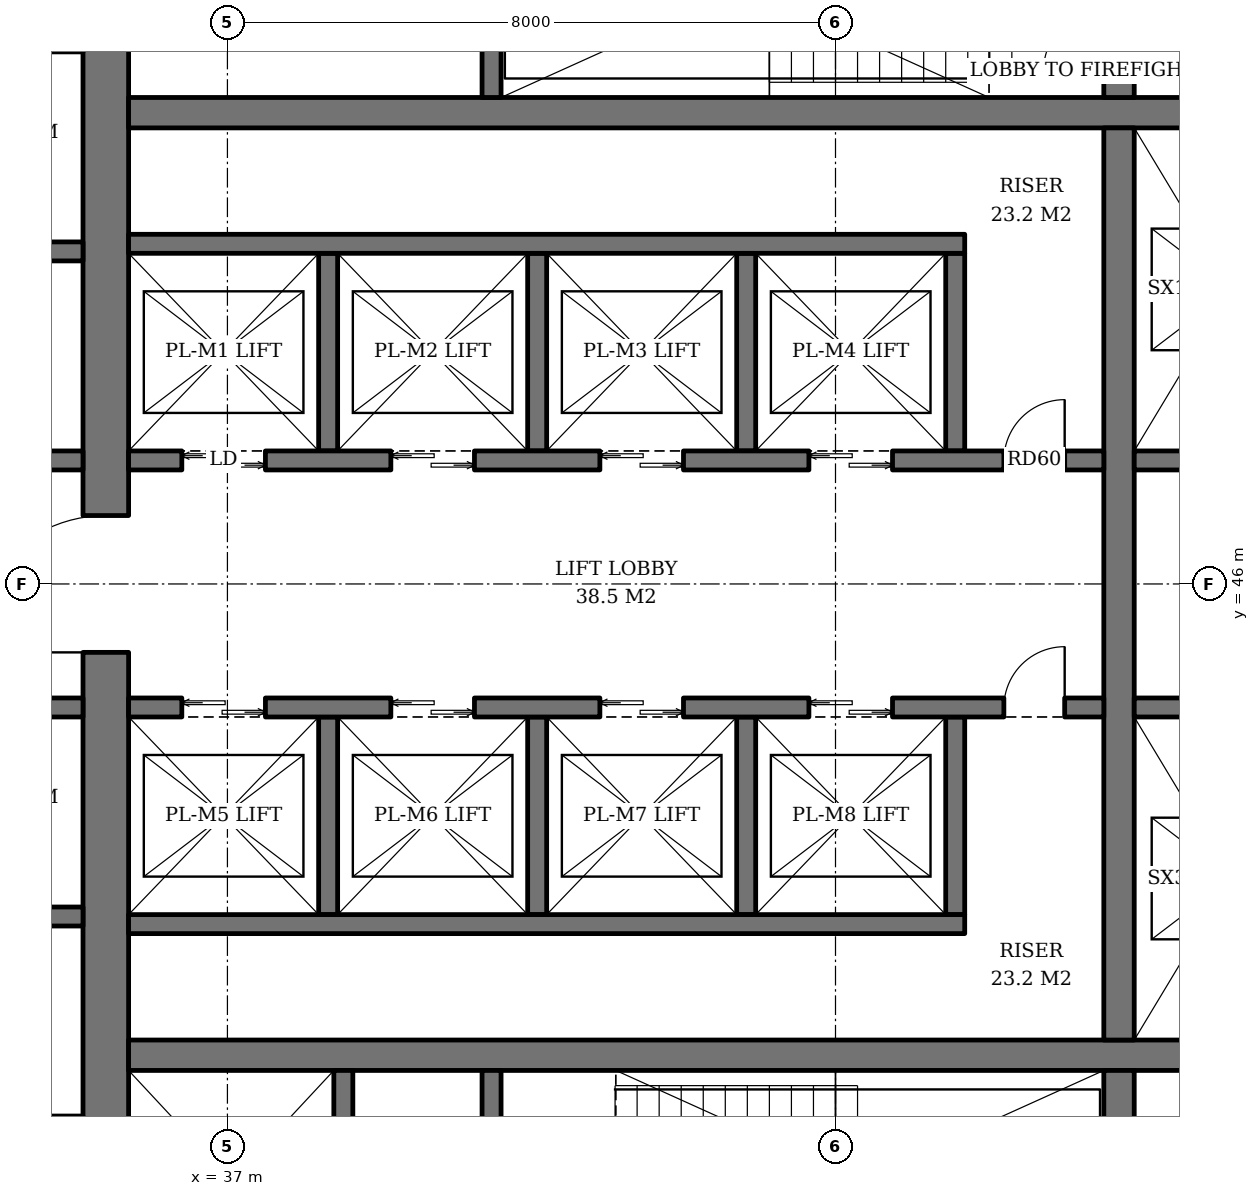
"""IFC4 building model, lengths in metres.
Left out: names, types, materials, properties, quantities, classifications, styles, units other than length and angle.
Written with IfcOpenShell. Run it as: python <this file> out.ifc"""

import sys

from ifc_helpers import new_model, si_unit, direction, frame, frame_2d, origin, place, context, subcontext, project, spatial, rectangle, extrude, element, fill, save


model = new_model("IFC4")
c1 = context("Model", 3, precision=1e-05, world=origin(), true_north=direction((0.0, 1.0)))
c2 = subcontext(c1, "Body", "Model", "MODEL_VIEW")
j1 = project(units=[si_unit("LENGTHUNIT", "METRE"), si_unit("PLANEANGLEUNIT", "RADIAN")], contexts=[c1])
p1 = place(None, origin())
s1 = spatial("IfcSite", under=j1, at=p1, CompositionType="ELEMENT")
p2 = place(p1, origin())
s2 = spatial("IfcBuilding", under=s1, at=p2, CompositionType="ELEMENT")
p3 = place(p2, frame((0.0, 0.0, 131.2)))
s3 = spatial("IfcBuildingStorey", under=s2, at=p3, CompositionType="ELEMENT", Elevation=131.2)
p4 = place(p3, frame((35.4, 36.7, 0.0), z_axis=(0.0, 0.0, 1.0), x_axis=(0.0, 1.0, 0.0)))
e1 = element("IfcWall", 1, at=p4, inside=s3, PredefinedType="SHEAR", context=c2, shape_type="SweptSolid", body=[
    extrude(rectangle(XDim=18.6, YDim=0.6, at=frame_2d((9.3, 0.0))), origin(), (0.0, 0.0, 1.0), 3.8),
])
p5 = place(p4, frame((8.4, 0.0, 0.0)))
e2 = element("IfcOpeningElement", 2, at=p5, cuts=e1, PredefinedType="OPENING", context=c2, shape_type="SweptSolid", body=[
    extrude(rectangle(XDim=1.8, YDim=2.4, at=frame_2d((0.9, 1.2))), frame((0.0, 0.31, 0.0), z_axis=(0.0, -1.0, 0.0), x_axis=(1.0, 0.0, 0.0)), (0.0, 0.0, 1.0), 0.62),
])
for number, where, z_axis, x_axis in (
    (3, (35.7, 39.8, 0.0), (0.0, 0.0, 1.0), (1.0, 0.0, 0.0)),
    (4, (35.7, 52.2, 0.0), (0.0, 0.0, 1.0), (1.0, 0.0, 0.0)),
):
    element("IfcWall", number, at=place(p3, frame(where, z_axis=z_axis, x_axis=x_axis)), inside=s3, PredefinedType="SHEAR", context=c2, shape_type="SweptSolid", body=[
        extrude(rectangle(XDim=18.6, YDim=0.4, at=frame_2d((9.3, 0.0))), origin(), (0.0, 0.0, 1.0), 3.8),
    ])
p6 = place(p3, frame((48.73, 36.7, 0.0), z_axis=(0.0, 0.0, 1.0), x_axis=(0.0, 1.0, 0.0)))
e5 = element("IfcWall", 5, at=p6, inside=s3, PredefinedType="SHEAR", context=c2, shape_type="SweptSolid", body=[
    extrude(rectangle(XDim=2.9, YDim=0.4, at=frame_2d((1.45, 0.0))), origin(), (0.0, 0.0, 1.0), 3.8),
])
p7 = place(p3, frame((48.73, 40.0, 0.0), z_axis=(0.0, 0.0, 1.0), x_axis=(0.0, 1.0, 0.0)))
e6 = element("IfcWall", 6, at=p7, inside=s3, PredefinedType="SHEAR", context=c2, shape_type="SweptSolid", body=[
    extrude(rectangle(XDim=12.0, YDim=0.4, at=frame_2d((6.0, 0.0))), origin(), (0.0, 0.0, 1.0), 3.8),
])
p8 = place(p3, frame((48.73, 52.4, 0.0), z_axis=(0.0, 0.0, 1.0), x_axis=(0.0, 1.0, 0.0)))
e7 = element("IfcWall", 7, at=p8, inside=s3, PredefinedType="SHEAR", context=c2, shape_type="SweptSolid", body=[
    extrude(rectangle(XDim=2.9, YDim=0.4, at=frame_2d((1.45, 0.0))), origin(), (0.0, 0.0, 1.0), 3.8),
])
p9 = place(p8, frame((0.3, 0.0, 0.0)))
e8 = element("IfcOpeningElement", 8, at=p9, cuts=e7, PredefinedType="OPENING", context=c2, shape_type="SweptSolid", body=[
    extrude(rectangle(XDim=1.0, YDim=2.1, at=frame_2d((0.5, 1.05))), frame((0.0, 0.21, 0.0), z_axis=(0.0, -1.0, 0.0), x_axis=(1.0, 0.0, 0.0)), (0.0, 0.0, 1.0), 0.42),
])
p10 = place(p3, frame((38.525, 36.7, 0.0), z_axis=(0.0, 0.0, 1.0), x_axis=(0.0, 1.0, 0.0)))
e9 = element("IfcWall", 9, at=p10, inside=s3, PredefinedType="SHEAR", context=c2, shape_type="SweptSolid", body=[
    extrude(rectangle(XDim=2.9, YDim=0.25, at=frame_2d((1.45, 0.0))), origin(), (0.0, 0.0, 1.0), 3.8),
])
p11 = place(p10, frame((0.8, 0.0, 0.0)))
e10 = element("IfcOpeningElement", 10, at=p11, cuts=e9, PredefinedType="OPENING", context=c2, shape_type="SweptSolid", body=[
    extrude(rectangle(XDim=1.3, YDim=2.2, at=frame_2d((0.65, 1.1))), frame((0.0, 0.135, 0.0), z_axis=(0.0, -1.0, 0.0), x_axis=(1.0, 0.0, 0.0)), (0.0, 0.0, 1.0), 0.27),
])
p12 = place(p3, frame((40.475, 36.7, 0.0), z_axis=(0.0, 0.0, 1.0), x_axis=(0.0, 1.0, 0.0)))
e11 = element("IfcWall", 11, at=p12, inside=s3, PredefinedType="SHEAR", context=c2, shape_type="SweptSolid", body=[
    extrude(rectangle(XDim=2.9, YDim=0.25, at=frame_2d((1.45, 0.0))), origin(), (0.0, 0.0, 1.0), 3.8),
])
p13 = place(p12, frame((0.75, 0.0, 0.0)))
e12 = element("IfcOpeningElement", 12, at=p13, cuts=e11, PredefinedType="OPENING", context=c2, shape_type="SweptSolid", body=[
    extrude(rectangle(XDim=1.2, YDim=2.1, at=frame_2d((0.6, 1.05))), frame((0.0, 0.135, 0.0), z_axis=(0.0, -1.0, 0.0), x_axis=(1.0, 0.0, 0.0)), (0.0, 0.0, 1.0), 0.27),
])
p14 = place(p3, frame((40.475, 52.4, 0.0), z_axis=(0.0, 0.0, 1.0), x_axis=(0.0, 1.0, 0.0)))
e13 = element("IfcWall", 13, at=p14, inside=s3, PredefinedType="SHEAR", context=c2, shape_type="SweptSolid", body=[
    extrude(rectangle(XDim=2.9, YDim=0.25, at=frame_2d((1.45, 0.0))), origin(), (0.0, 0.0, 1.0), 3.8),
])
for number, where, z_axis, x_axis in (
    (14, (38.325, 47.75, 0.0), (0.0, 0.0, 1.0), (0.0, 1.0, 0.0)),
    (15, (41.075, 47.75, 0.0), (0.0, 0.0, 1.0), (0.0, 1.0, 0.0)),
    (16, (43.825, 47.75, 0.0), (0.0, 0.0, 1.0), (0.0, 1.0, 0.0)),
    (17, (46.575, 47.75, 0.0), (0.0, 0.0, 1.0), (0.0, 1.0, 0.0)),
):
    element("IfcWall", number, at=place(p3, frame(where, z_axis=z_axis, x_axis=x_axis)), inside=s3, PredefinedType="SHEAR", context=c2, shape_type="SweptSolid", body=[
        extrude(rectangle(XDim=2.6, YDim=0.25, at=frame_2d((1.3, 0.0))), origin(), (0.0, 0.0, 1.0), 3.8),
    ])
p15 = place(p3, frame((35.7, 50.475, 0.0), z_axis=(0.0, 0.0, 1.0), x_axis=(1.0, 0.0, 0.0)))
e18 = element("IfcWall", 18, at=p15, inside=s3, PredefinedType="SHEAR", context=c2, shape_type="SweptSolid", body=[
    extrude(rectangle(XDim=11.0, YDim=0.25, at=frame_2d((5.5, 0.0))), origin(), (0.0, 0.0, 1.0), 3.8),
])
p16 = place(p3, frame((35.7, 47.625, 0.0), z_axis=(0.0, 0.0, 1.0), x_axis=(1.0, 0.0, 0.0)))
e19 = element("IfcWall", 19, at=p16, inside=s3, PredefinedType="SHEAR", context=c2, shape_type="SweptSolid", body=[
    extrude(rectangle(XDim=12.83, YDim=0.25, at=frame_2d((6.415, 0.0))), origin(), (0.0, 0.0, 1.0), 3.8),
])
p17 = place(p16, frame((0.7, 0.0, 0.0)))
e20 = element("IfcOpeningElement", 20, at=p17, cuts=e19, PredefinedType="OPENING", context=c2, shape_type="SweptSolid", body=[
    extrude(rectangle(XDim=1.1, YDim=2.2, at=frame_2d((0.55, 1.1))), frame((0.0, 0.135, 0.0), z_axis=(0.0, -1.0, 0.0), x_axis=(1.0, 0.0, 0.0)), (0.0, 0.0, 1.0), 0.27),
])
p18 = place(p16, frame((3.45, 0.0, 0.0)))
e21 = element("IfcOpeningElement", 21, at=p18, cuts=e19, PredefinedType="OPENING", context=c2, shape_type="SweptSolid", body=[
    extrude(rectangle(XDim=1.1, YDim=2.2, at=frame_2d((0.55, 1.1))), frame((0.0, 0.135, 0.0), z_axis=(0.0, -1.0, 0.0), x_axis=(1.0, 0.0, 0.0)), (0.0, 0.0, 1.0), 0.27),
])
p19 = place(p16, frame((6.2, 0.0, 0.0)))
e22 = element("IfcOpeningElement", 22, at=p19, cuts=e19, PredefinedType="OPENING", context=c2, shape_type="SweptSolid", body=[
    extrude(rectangle(XDim=1.1, YDim=2.2, at=frame_2d((0.55, 1.1))), frame((0.0, 0.135, 0.0), z_axis=(0.0, -1.0, 0.0), x_axis=(1.0, 0.0, 0.0)), (0.0, 0.0, 1.0), 0.27),
])
p20 = place(p16, frame((8.95, 0.0, 0.0)))
e23 = element("IfcOpeningElement", 23, at=p20, cuts=e19, PredefinedType="OPENING", context=c2, shape_type="SweptSolid", body=[
    extrude(rectangle(XDim=1.1, YDim=2.2, at=frame_2d((0.55, 1.1))), frame((0.0, 0.135, 0.0), z_axis=(0.0, -1.0, 0.0), x_axis=(1.0, 0.0, 0.0)), (0.0, 0.0, 1.0), 0.27),
])
p21 = place(p16, frame((11.515, 0.0, 0.0)))
e24 = element("IfcOpeningElement", 24, at=p21, cuts=e19, PredefinedType="OPENING", context=c2, shape_type="SweptSolid", body=[
    extrude(rectangle(XDim=0.8, YDim=2.0, at=frame_2d((0.4, 1.0))), frame((0.0, 0.135, 0.0), z_axis=(0.0, -1.0, 0.0), x_axis=(1.0, 0.0, 0.0)), (0.0, 0.0, 1.0), 0.27),
])
for number, where, z_axis, x_axis in (
    (25, (38.325, 44.25, 0.0), (0.0, 0.0, 1.0), (0.0, -1.0, 0.0)),
    (26, (41.075, 44.25, 0.0), (0.0, 0.0, 1.0), (0.0, -1.0, 0.0)),
    (27, (43.825, 44.25, 0.0), (0.0, 0.0, 1.0), (0.0, -1.0, 0.0)),
    (28, (46.575, 44.25, 0.0), (0.0, 0.0, 1.0), (0.0, -1.0, 0.0)),
):
    element("IfcWall", number, at=place(p3, frame(where, z_axis=z_axis, x_axis=x_axis)), inside=s3, PredefinedType="SHEAR", context=c2, shape_type="SweptSolid", body=[
        extrude(rectangle(XDim=2.6, YDim=0.25, at=frame_2d((1.3, 0.0))), origin(), (0.0, 0.0, 1.0), 3.8),
    ])
p22 = place(p3, frame((35.7, 41.525, 0.0), z_axis=(0.0, 0.0, 1.0), x_axis=(1.0, 0.0, 0.0)))
e29 = element("IfcWall", 29, at=p22, inside=s3, PredefinedType="SHEAR", context=c2, shape_type="SweptSolid", body=[
    extrude(rectangle(XDim=11.0, YDim=0.25, at=frame_2d((5.5, 0.0))), origin(), (0.0, 0.0, 1.0), 3.8),
])
p23 = place(p3, frame((35.7, 44.375, 0.0), z_axis=(0.0, 0.0, 1.0), x_axis=(1.0, 0.0, 0.0)))
e30 = element("IfcWall", 30, at=p23, inside=s3, PredefinedType="SHEAR", context=c2, shape_type="SweptSolid", body=[
    extrude(rectangle(XDim=12.83, YDim=0.25, at=frame_2d((6.415, 0.0))), origin(), (0.0, 0.0, 1.0), 3.8),
])
p24 = place(p23, frame((0.7, 0.0, 0.0)))
e31 = element("IfcOpeningElement", 31, at=p24, cuts=e30, PredefinedType="OPENING", context=c2, shape_type="SweptSolid", body=[
    extrude(rectangle(XDim=1.1, YDim=2.2, at=frame_2d((0.55, 1.1))), frame((0.0, 0.135, 0.0), z_axis=(0.0, -1.0, 0.0), x_axis=(1.0, 0.0, 0.0)), (0.0, 0.0, 1.0), 0.27),
])
p25 = place(p23, frame((3.45, 0.0, 0.0)))
e32 = element("IfcOpeningElement", 32, at=p25, cuts=e30, PredefinedType="OPENING", context=c2, shape_type="SweptSolid", body=[
    extrude(rectangle(XDim=1.1, YDim=2.2, at=frame_2d((0.55, 1.1))), frame((0.0, 0.135, 0.0), z_axis=(0.0, -1.0, 0.0), x_axis=(1.0, 0.0, 0.0)), (0.0, 0.0, 1.0), 0.27),
])
p26 = place(p23, frame((6.2, 0.0, 0.0)))
e33 = element("IfcOpeningElement", 33, at=p26, cuts=e30, PredefinedType="OPENING", context=c2, shape_type="SweptSolid", body=[
    extrude(rectangle(XDim=1.1, YDim=2.2, at=frame_2d((0.55, 1.1))), frame((0.0, 0.135, 0.0), z_axis=(0.0, -1.0, 0.0), x_axis=(1.0, 0.0, 0.0)), (0.0, 0.0, 1.0), 0.27),
])
p27 = place(p23, frame((8.95, 0.0, 0.0)))
e34 = element("IfcOpeningElement", 34, at=p27, cuts=e30, PredefinedType="OPENING", context=c2, shape_type="SweptSolid", body=[
    extrude(rectangle(XDim=1.1, YDim=2.2, at=frame_2d((0.55, 1.1))), frame((0.0, 0.135, 0.0), z_axis=(0.0, -1.0, 0.0), x_axis=(1.0, 0.0, 0.0)), (0.0, 0.0, 1.0), 0.27),
])
p28 = place(p23, frame((11.515, 0.0, 0.0)))
e35 = element("IfcOpeningElement", 35, at=p28, cuts=e30, PredefinedType="OPENING", context=c2, shape_type="SweptSolid", body=[
    extrude(rectangle(XDim=0.8, YDim=2.0, at=frame_2d((0.4, 1.0))), frame((0.0, 0.135, 0.0), z_axis=(0.0, -1.0, 0.0), x_axis=(1.0, 0.0, 0.0)), (0.0, 0.0, 1.0), 0.27),
])
for number, where, z_axis, x_axis in (
    (36, (48.93, 47.625, 0.0), (0.0, 0.0, 1.0), (1.0, 0.0, 0.0)),
    (37, (48.93, 44.375, 0.0), (0.0, 0.0, 1.0), (1.0, 0.0, 0.0)),
):
    element("IfcWall", number, at=place(p3, frame(where, z_axis=z_axis, x_axis=x_axis)), inside=s3, PredefinedType="SHEAR", context=c2, shape_type="SweptSolid", body=[
        extrude(rectangle(XDim=5.37, YDim=0.25, at=frame_2d((2.685, 0.0))), origin(), (0.0, 0.0, 1.0), 3.8),
    ])
for number, where, z_axis, x_axis in (
    (38, (32.4, 41.625, 0.0), (0.0, 0.0, 1.0), (1.0, 0.0, 0.0)),
    (39, (32.4, 44.375, 0.0), (0.0, 0.0, 1.0), (1.0, 0.0, 0.0)),
    (40, (32.4, 47.625, 0.0), (0.0, 0.0, 1.0), (1.0, 0.0, 0.0)),
    (41, (32.4, 50.375, 0.0), (0.0, 0.0, 1.0), (1.0, 0.0, 0.0)),
):
    element("IfcWall", number, at=place(p3, frame(where, z_axis=z_axis, x_axis=x_axis)), inside=s3, PredefinedType="SHEAR", context=c2, shape_type="SweptSolid", body=[
        extrude(rectangle(XDim=2.7, YDim=0.25, at=frame_2d((1.35, 0.0))), origin(), (0.0, 0.0, 1.0), 3.8),
    ])
p29 = place(p17, origin())
e42 = element("IfcDoor", 42, at=p29, inside=s3, OperationType="DOUBLE_DOOR_SLIDING", PredefinedType="DOOR", context=c2, shape_type="SweptSolid", body=[
    extrude(rectangle(XDim=1.1, YDim=2.2, at=frame_2d((0.55, 1.1))), frame((0.0, 0.025, 0.0), z_axis=(0.0, -1.0, 0.0), x_axis=(1.0, 0.0, 0.0)), (0.0, 0.0, 1.0), 0.05),
])
fill(e20, e42)
p30 = place(p18, origin())
e43 = element("IfcDoor", 43, at=p30, inside=s3, OperationType="DOUBLE_DOOR_SLIDING", PredefinedType="DOOR", context=c2, shape_type="SweptSolid", body=[
    extrude(rectangle(XDim=1.1, YDim=2.2, at=frame_2d((0.55, 1.1))), frame((0.0, 0.025, 0.0), z_axis=(0.0, -1.0, 0.0), x_axis=(1.0, 0.0, 0.0)), (0.0, 0.0, 1.0), 0.05),
])
fill(e21, e43)
p31 = place(p19, origin())
e44 = element("IfcDoor", 44, at=p31, inside=s3, OperationType="DOUBLE_DOOR_SLIDING", PredefinedType="DOOR", context=c2, shape_type="SweptSolid", body=[
    extrude(rectangle(XDim=1.1, YDim=2.2, at=frame_2d((0.55, 1.1))), frame((0.0, 0.025, 0.0), z_axis=(0.0, -1.0, 0.0), x_axis=(1.0, 0.0, 0.0)), (0.0, 0.0, 1.0), 0.05),
])
fill(e22, e44)
p32 = place(p20, origin())
e45 = element("IfcDoor", 45, at=p32, inside=s3, OperationType="DOUBLE_DOOR_SLIDING", PredefinedType="DOOR", context=c2, shape_type="SweptSolid", body=[
    extrude(rectangle(XDim=1.1, YDim=2.2, at=frame_2d((0.55, 1.1))), frame((0.0, 0.025, 0.0), z_axis=(0.0, -1.0, 0.0), x_axis=(1.0, 0.0, 0.0)), (0.0, 0.0, 1.0), 0.05),
])
fill(e23, e45)
p33 = place(p21, origin())
e46 = element("IfcDoor", 46, at=p33, inside=s3, OperationType="SINGLE_SWING_RIGHT", PredefinedType="DOOR", context=c2, shape_type="SweptSolid", body=[
    extrude(rectangle(XDim=0.8, YDim=2.0, at=frame_2d((0.4, 1.0))), frame((0.0, 0.025, 0.0), z_axis=(0.0, -1.0, 0.0), x_axis=(1.0, 0.0, 0.0)), (0.0, 0.0, 1.0), 0.05),
])
fill(e24, e46)
p34 = place(p24, origin())
e47 = element("IfcDoor", 47, at=p34, inside=s3, OperationType="DOUBLE_DOOR_SLIDING", PredefinedType="DOOR", context=c2, shape_type="SweptSolid", body=[
    extrude(rectangle(XDim=1.1, YDim=2.2, at=frame_2d((0.55, 1.1))), frame((0.0, 0.025, 0.0), z_axis=(0.0, -1.0, 0.0), x_axis=(1.0, 0.0, 0.0)), (0.0, 0.0, 1.0), 0.05),
])
fill(e31, e47)
p35 = place(p25, origin())
e48 = element("IfcDoor", 48, at=p35, inside=s3, OperationType="DOUBLE_DOOR_SLIDING", PredefinedType="DOOR", context=c2, shape_type="SweptSolid", body=[
    extrude(rectangle(XDim=1.1, YDim=2.2, at=frame_2d((0.55, 1.1))), frame((0.0, 0.025, 0.0), z_axis=(0.0, -1.0, 0.0), x_axis=(1.0, 0.0, 0.0)), (0.0, 0.0, 1.0), 0.05),
])
fill(e32, e48)
p36 = place(p26, origin())
e49 = element("IfcDoor", 49, at=p36, inside=s3, OperationType="DOUBLE_DOOR_SLIDING", PredefinedType="DOOR", context=c2, shape_type="SweptSolid", body=[
    extrude(rectangle(XDim=1.1, YDim=2.2, at=frame_2d((0.55, 1.1))), frame((0.0, 0.025, 0.0), z_axis=(0.0, -1.0, 0.0), x_axis=(1.0, 0.0, 0.0)), (0.0, 0.0, 1.0), 0.05),
])
fill(e33, e49)
p37 = place(p27, origin())
e50 = element("IfcDoor", 50, at=p37, inside=s3, OperationType="DOUBLE_DOOR_SLIDING", PredefinedType="DOOR", context=c2, shape_type="SweptSolid", body=[
    extrude(rectangle(XDim=1.1, YDim=2.2, at=frame_2d((0.55, 1.1))), frame((0.0, 0.025, 0.0), z_axis=(0.0, -1.0, 0.0), x_axis=(1.0, 0.0, 0.0)), (0.0, 0.0, 1.0), 0.05),
])
fill(e34, e50)
p38 = place(p28, origin())
e51 = element("IfcDoor", 51, at=p38, inside=s3, OperationType="SINGLE_SWING_RIGHT", PredefinedType="DOOR", context=c2, shape_type="SweptSolid", body=[
    extrude(rectangle(XDim=0.8, YDim=2.0, at=frame_2d((0.4, 1.0))), frame((0.0, 0.025, 0.0), z_axis=(0.0, -1.0, 0.0), x_axis=(1.0, 0.0, 0.0)), (0.0, 0.0, 1.0), 0.05),
])
fill(e35, e51)
p39 = place(p9, origin())
e52 = element("IfcDoor", 52, at=p39, inside=s3, OperationType="SINGLE_SWING_LEFT", PredefinedType="DOOR", context=c2, shape_type="SweptSolid", body=[
    extrude(rectangle(XDim=1.0, YDim=2.1, at=frame_2d((0.5, 1.05))), frame((0.0, 0.025, 0.0), z_axis=(0.0, -1.0, 0.0), x_axis=(1.0, 0.0, 0.0)), (0.0, 0.0, 1.0), 0.05),
])
fill(e8, e52)
p40 = place(p5, origin())
e53 = element("IfcDoor", 53, at=p40, inside=s3, OperationType="DOUBLE_DOOR_SINGLE_SWING", PredefinedType="DOOR", context=c2, shape_type="SweptSolid", body=[
    extrude(rectangle(XDim=1.8, YDim=2.4, at=frame_2d((0.9, 1.2))), frame((0.0, 0.025, 0.0), z_axis=(0.0, -1.0, 0.0), x_axis=(1.0, 0.0, 0.0)), (0.0, 0.0, 1.0), 0.05),
])
fill(e2, e53)
save(model, sys.argv[1])
